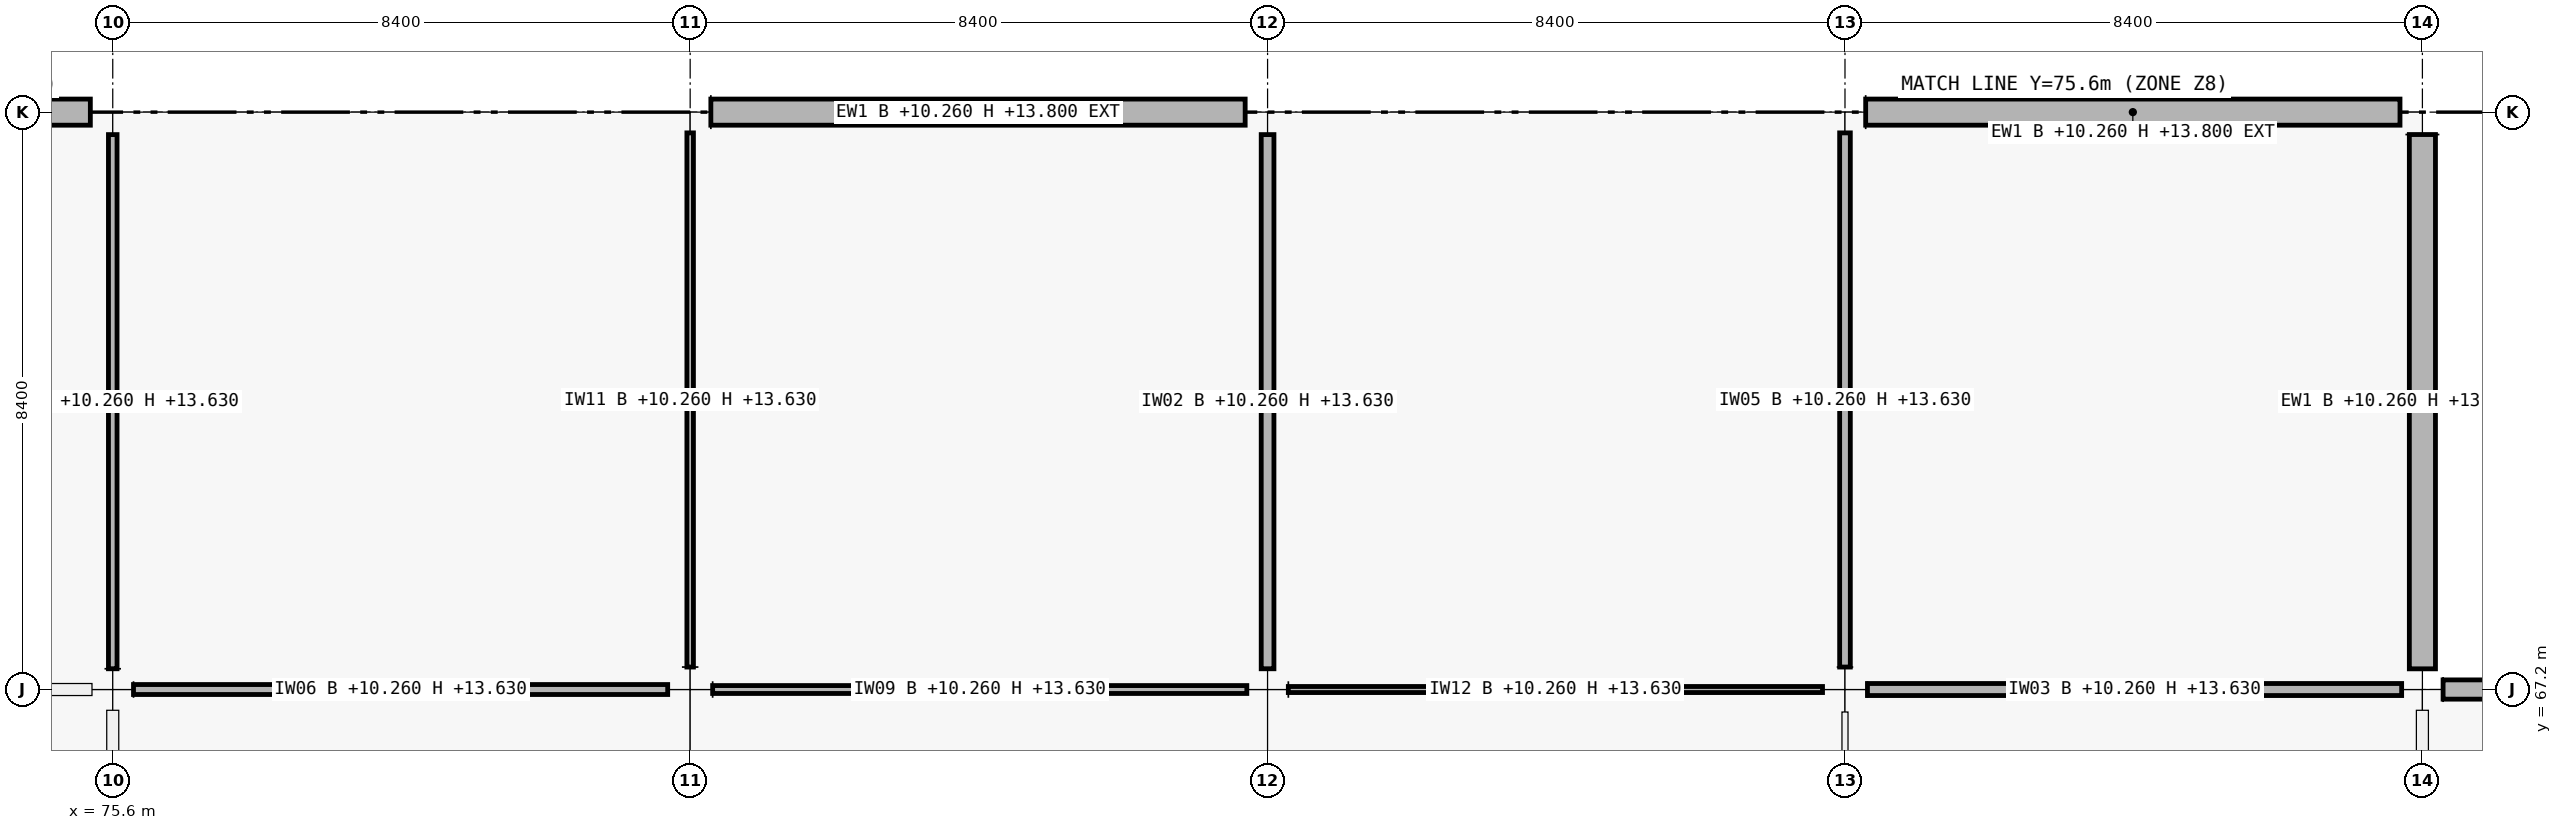
"""IFC4 building model, lengths in metres.
Left out: names, types, materials, properties, quantities, classifications, styles, units other than length and angle.
Written with IfcOpenShell. Run it as: python <this file> out.ifc"""

import sys

from ifc_helpers import new_model, si_unit, direction, frame, frame_2d, origin, origin_2d, place, context, subcontext, project, spatial, rectangle, extrude, element, fill, save


model = new_model("IFC4")
c1 = context("Model", 3, precision=1e-05, world=origin(), true_north=direction((0.0, 1.0)))
c2 = subcontext(c1, "Body", "Model", "MODEL_VIEW")
j1 = project(units=[si_unit("LENGTHUNIT", "METRE"), si_unit("PLANEANGLEUNIT", "RADIAN")], contexts=[c1])
p1 = place(None, origin())
s1 = spatial("IfcSite", under=j1, at=p1, CompositionType="ELEMENT")
p2 = place(p1, origin())
s2 = spatial("IfcBuilding", under=s1, at=p2, CompositionType="ELEMENT")
p3 = place(p2, frame((0.0, 0.0, 10.26)))
s3 = spatial("IfcBuildingStorey", under=s2, at=p3, CompositionType="ELEMENT", Elevation=10.26)
p4 = place(p3, frame((75.6, 67.2, 0.0), z_axis=(0.0, 0.0, 1.0), x_axis=(1.0, 0.0, 0.0)))
e1 = element("IfcColumn", 1, at=p4, inside=s3, PredefinedType="COLUMN", context=c2, shape_type="SweptSolid", body=[
    extrude(rectangle(XDim=0.6, YDim=0.6, at=origin_2d()), origin(), (0.0, 0.0, 1.0), 4.5),
])
for number, where, z_axis, x_axis in (
    (2, (75.6, 75.6, 0.0), (0.0, 0.0, 1.0), (1.0, 0.0, 0.0)),
    (3, (84.0, 67.2, 0.0), (0.0, 0.0, 1.0), (1.0, 0.0, 0.0)),
):
    element("IfcColumn", number, at=place(p3, frame(where, z_axis=z_axis, x_axis=x_axis)), inside=s3, PredefinedType="COLUMN", context=c2, shape_type="SweptSolid", body=[
        extrude(rectangle(XDim=0.65, YDim=0.65, at=origin_2d()), origin(), (0.0, 0.0, 1.0), 4.5),
    ])
for number, where, z_axis, x_axis in (
    (4, (84.0, 75.6, 0.0), (0.0, 0.0, 1.0), (1.0, 0.0, 0.0)),
    (5, (92.4, 67.2, 0.0), (0.0, 0.0, 1.0), (1.0, 0.0, 0.0)),
):
    element("IfcColumn", number, at=place(p3, frame(where, z_axis=z_axis, x_axis=x_axis)), inside=s3, PredefinedType="COLUMN", context=c2, shape_type="SweptSolid", body=[
        extrude(rectangle(XDim=0.6, YDim=0.6, at=origin_2d()), origin(), (0.0, 0.0, 1.0), 4.5),
    ])
for number, where, z_axis, x_axis in (
    (6, (92.4, 75.6, 0.0), (0.0, 0.0, 1.0), (1.0, 0.0, 0.0)),
    (7, (100.8, 67.2, 0.0), (0.0, 0.0, 1.0), (1.0, 0.0, 0.0)),
):
    element("IfcColumn", number, at=place(p3, frame(where, z_axis=z_axis, x_axis=x_axis)), inside=s3, PredefinedType="COLUMN", context=c2, shape_type="SweptSolid", body=[
        extrude(rectangle(XDim=0.65, YDim=0.65, at=origin_2d()), origin(), (0.0, 0.0, 1.0), 4.5),
    ])
for number, where, z_axis, x_axis in (
    (8, (100.8, 75.6, 0.0), (0.0, 0.0, 1.0), (1.0, 0.0, 0.0)),
    (9, (109.2, 67.2, 0.0), (0.0, 0.0, 1.0), (1.0, 0.0, 0.0)),
):
    element("IfcColumn", number, at=place(p3, frame(where, z_axis=z_axis, x_axis=x_axis)), inside=s3, PredefinedType="COLUMN", context=c2, shape_type="SweptSolid", body=[
        extrude(rectangle(XDim=0.6, YDim=0.6, at=origin_2d()), origin(), (0.0, 0.0, 1.0), 4.5),
    ])
p5 = place(p3, frame((109.2, 75.6, 0.0), z_axis=(0.0, 0.0, 1.0), x_axis=(1.0, 0.0, 0.0)))
e10 = element("IfcColumn", 10, at=p5, inside=s3, PredefinedType="COLUMN", context=c2, shape_type="SweptSolid", body=[
    extrude(rectangle(XDim=0.65, YDim=0.65, at=origin_2d()), origin(), (0.0, 0.0, 1.0), 4.5),
])
p6 = place(p3, frame((67.501, 75.6, 0.0), z_axis=(0.0, 0.0, 1.0), x_axis=(1.0, 0.0, 0.0)))
e11 = element("IfcWall", 11, at=p6, inside=s3, PredefinedType="SOLIDWALL", context=c2, shape_type="SweptSolid", body=[
    extrude(rectangle(XDim=7.773, YDim=0.38, at=frame_2d((3.886, 0.0))), origin(), (0.0, 0.0, 1.0), 3.54),
])
p7 = place(p3, frame((84.301, 75.6, 0.0), z_axis=(0.0, 0.0, 1.0), x_axis=(1.0, 0.0, 0.0)))
e12 = element("IfcWall", 12, at=p7, inside=s3, PredefinedType="SOLIDWALL", context=c2, shape_type="SweptSolid", body=[
    extrude(rectangle(XDim=7.773, YDim=0.38, at=frame_2d((3.886, 0.0))), origin(), (0.0, 0.0, 1.0), 3.54),
])
p8 = place(p7, frame((3.136, 0.0, 1.55)))
e13 = element("IfcOpeningElement", 13, at=p8, cuts=e12, PredefinedType="OPENING", context=c2, shape_type="SweptSolid", body=[
    extrude(rectangle(XDim=1.5, YDim=1.2, at=frame_2d((0.75, 0.6))), frame((0.0, 0.19, 0.0), z_axis=(0.0, -1.0, 0.0), x_axis=(1.0, 0.0, 0.0)), (0.0, 0.0, 1.0), 0.38),
])
for number, where, z_axis, x_axis in (
    (14, (101.101, 75.6, 0.0), (0.0, 0.0, 1.0), (1.0, 0.0, 0.0)),
    (15, (109.2, 75.274, 0.0), (0.0, 0.0, 1.0), (0.0, -1.0, 0.0)),
):
    element("IfcWall", number, at=place(p3, frame(where, z_axis=z_axis, x_axis=x_axis)), inside=s3, PredefinedType="SOLIDWALL", context=c2, shape_type="SweptSolid", body=[
        extrude(rectangle(XDim=7.773, YDim=0.38, at=frame_2d((3.886, 0.0))), origin(), (0.0, 0.0, 1.0), 3.54),
    ])
p9 = place(p3, frame((109.501, 67.2, 0.0), z_axis=(0.0, 0.0, 1.0), x_axis=(1.0, 0.0, 0.0)))
e16 = element("IfcWall", 16, at=p9, inside=s3, PredefinedType="SOLIDWALL", context=c2, shape_type="SweptSolid", body=[
    extrude(rectangle(XDim=7.823, YDim=0.28, at=frame_2d((3.912, 0.0))), origin(), (0.0, 0.0, 1.0), 3.54),
])
p10 = place(p9, frame((2.837, 0.0, 0.9)))
e17 = element("IfcOpeningElement", 17, at=p10, cuts=e16, PredefinedType="OPENING", context=c2, shape_type="SweptSolid", body=[
    extrude(rectangle(XDim=2.15, YDim=1.95, at=frame_2d((1.075, 0.975))), frame((0.0, 0.14, 0.0), z_axis=(0.0, -1.0, 0.0), x_axis=(1.0, 0.0, 0.0)), (0.0, 0.0, 1.0), 0.28),
])
p11 = place(p3, frame((67.527, 67.2, 0.0), z_axis=(0.0, 0.0, 1.0), x_axis=(1.0, 0.0, 0.0)))
e18 = element("IfcWall", 18, at=p11, inside=s3, PredefinedType="PARTITIONING", context=c2, shape_type="SweptSolid", body=[
    extrude(rectangle(XDim=7.771, YDim=0.175, at=frame_2d((3.885, 0.0))), origin(), (0.0, 0.0, 1.0), 3.37),
])
p12 = place(p11, frame((3.085, 0.0, 0.0)))
e19 = element("IfcOpeningElement", 19, at=p12, cuts=e18, PredefinedType="OPENING", context=c2, shape_type="SweptSolid", body=[
    extrude(rectangle(XDim=1.6, YDim=2.3, at=frame_2d((0.8, 1.15))), frame((0.0, 0.087, 0.0), z_axis=(0.0, -1.0, 0.0), x_axis=(1.0, 0.0, 0.0)), (0.0, 0.0, 1.0), 0.175),
])
p13 = place(p3, frame((75.902, 67.2, 0.0), z_axis=(0.0, 0.0, 1.0), x_axis=(1.0, 0.0, 0.0)))
e20 = element("IfcWall", 20, at=p13, inside=s3, PredefinedType="PARTITIONING", context=c2, shape_type="SweptSolid", body=[
    extrude(rectangle(XDim=7.771, YDim=0.145, at=frame_2d((3.885, 0.0))), origin(), (0.0, 0.0, 1.0), 3.37),
])
p14 = place(p13, frame((3.16, 0.0, 0.0)))
e21 = element("IfcOpeningElement", 21, at=p14, cuts=e20, PredefinedType="OPENING", context=c2, shape_type="SweptSolid", body=[
    extrude(rectangle(XDim=1.45, YDim=2.2, at=frame_2d((0.725, 1.1))), frame((0.0, 0.073, 0.0), z_axis=(0.0, -1.0, 0.0), x_axis=(1.0, 0.0, 0.0)), (0.0, 0.0, 1.0), 0.145),
])
p15 = place(p3, frame((84.327, 67.2, 0.0), z_axis=(0.0, 0.0, 1.0), x_axis=(1.0, 0.0, 0.0)))
e22 = element("IfcWall", 22, at=p15, inside=s3, PredefinedType="PARTITIONING", context=c2, shape_type="SweptSolid", body=[
    extrude(rectangle(XDim=7.771, YDim=0.115, at=frame_2d((3.885, 0.0))), origin(), (0.0, 0.0, 1.0), 3.37),
])
p16 = place(p15, frame((3.21, 0.0, 0.0)))
e23 = element("IfcOpeningElement", 23, at=p16, cuts=e22, PredefinedType="OPENING", context=c2, shape_type="SweptSolid", body=[
    extrude(rectangle(XDim=1.35, YDim=2.2, at=frame_2d((0.675, 1.1))), frame((0.0, 0.058, 0.0), z_axis=(0.0, -1.0, 0.0), x_axis=(1.0, 0.0, 0.0)), (0.0, 0.0, 1.0), 0.115),
])
p17 = place(p3, frame((92.702, 67.2, 0.0), z_axis=(0.0, 0.0, 1.0), x_axis=(1.0, 0.0, 0.0)))
e24 = element("IfcWall", 24, at=p17, inside=s3, PredefinedType="PARTITIONING", context=c2, shape_type="SweptSolid", body=[
    extrude(rectangle(XDim=7.771, YDim=0.088, at=frame_2d((3.885, 0.0))), origin(), (0.0, 0.0, 1.0), 3.37),
])
p18 = place(p17, frame((3.085, 0.0, 0.0)))
e25 = element("IfcOpeningElement", 25, at=p18, cuts=e24, PredefinedType="OPENING", context=c2, shape_type="SweptSolid", body=[
    extrude(rectangle(XDim=1.6, YDim=2.3, at=frame_2d((0.8, 1.15))), frame((0.0, 0.044, 0.0), z_axis=(0.0, -1.0, 0.0), x_axis=(1.0, 0.0, 0.0)), (0.0, 0.0, 1.0), 0.088),
])
p19 = place(p3, frame((101.127, 67.2, 0.0), z_axis=(0.0, 0.0, 1.0), x_axis=(1.0, 0.0, 0.0)))
e26 = element("IfcWall", 26, at=p19, inside=s3, PredefinedType="PARTITIONING", context=c2, shape_type="SweptSolid", body=[
    extrude(rectangle(XDim=7.771, YDim=0.175, at=frame_2d((3.885, 0.0))), origin(), (0.0, 0.0, 1.0), 3.37),
])
p20 = place(p19, frame((3.186, 0.0, 0.0)))
e27 = element("IfcOpeningElement", 27, at=p20, cuts=e26, PredefinedType="OPENING", context=c2, shape_type="SweptSolid", body=[
    extrude(rectangle(XDim=1.4, YDim=2.25, at=frame_2d((0.7, 1.125))), frame((0.0, 0.087, 0.0), z_axis=(0.0, -1.0, 0.0), x_axis=(1.0, 0.0, 0.0)), (0.0, 0.0, 1.0), 0.175),
])
p21 = place(p3, frame((75.6, 59.127, 0.0), z_axis=(0.0, 0.0, 1.0), x_axis=(0.0, 1.0, 0.0)))
e28 = element("IfcWall", 28, at=p21, inside=s3, PredefinedType="PARTITIONING", context=c2, shape_type="SweptSolid", body=[
    extrude(rectangle(XDim=7.771, YDim=0.175, at=frame_2d((3.885, 0.0))), origin(), (0.0, 0.0, 1.0), 3.37),
])
p22 = place(p21, frame((2.986, 0.0, 0.0)))
e29 = element("IfcOpeningElement", 29, at=p22, cuts=e28, PredefinedType="OPENING", context=c2, shape_type="SweptSolid", body=[
    extrude(rectangle(XDim=1.8, YDim=2.4, at=frame_2d((0.9, 1.2))), frame((0.0, 0.087, 0.0), z_axis=(0.0, -1.0, 0.0), x_axis=(1.0, 0.0, 0.0)), (0.0, 0.0, 1.0), 0.175),
])
p23 = place(p3, frame((75.6, 67.502, 0.0), z_axis=(0.0, 0.0, 1.0), x_axis=(0.0, 1.0, 0.0)))
e30 = element("IfcWall", 30, at=p23, inside=s3, PredefinedType="PARTITIONING", context=c2, shape_type="SweptSolid", body=[
    extrude(rectangle(XDim=7.771, YDim=0.125, at=frame_2d((3.885, 0.0))), origin(), (0.0, 0.0, 1.0), 3.37),
])
p24 = place(p23, frame((3.425, 0.0, 0.0)))
e31 = element("IfcOpeningElement", 31, at=p24, cuts=e30, PredefinedType="OPENING", context=c2, shape_type="SweptSolid", body=[
    extrude(rectangle(XDim=0.92, YDim=2.15, at=frame_2d((0.46, 1.075))), frame((0.0, 0.062, 0.0), z_axis=(0.0, -1.0, 0.0), x_axis=(1.0, 0.0, 0.0)), (0.0, 0.0, 1.0), 0.125),
])
p25 = place(p3, frame((84.0, 67.527, 0.0), z_axis=(0.0, 0.0, 1.0), x_axis=(0.0, 1.0, 0.0)))
e32 = element("IfcWall", 32, at=p25, inside=s3, PredefinedType="PARTITIONING", context=c2, shape_type="SweptSolid", body=[
    extrude(rectangle(XDim=7.771, YDim=0.095, at=frame_2d((3.885, 0.0))), origin(), (0.0, 0.0, 1.0), 3.37),
])
p26 = place(p25, frame((3.361, 0.0, 0.0)))
e33 = element("IfcOpeningElement", 33, at=p26, cuts=e32, PredefinedType="OPENING", context=c2, shape_type="SweptSolid", body=[
    extrude(rectangle(XDim=1.05, YDim=2.12, at=frame_2d((0.525, 1.06))), frame((0.0, 0.047, 0.0), z_axis=(0.0, -1.0, 0.0), x_axis=(1.0, 0.0, 0.0)), (0.0, 0.0, 1.0), 0.095),
])
p27 = place(p3, frame((92.4, 67.502, 0.0), z_axis=(0.0, 0.0, 1.0), x_axis=(0.0, 1.0, 0.0)))
e34 = element("IfcWall", 34, at=p27, inside=s3, PredefinedType="PARTITIONING", context=c2, shape_type="SweptSolid", body=[
    extrude(rectangle(XDim=7.771, YDim=0.185, at=frame_2d((3.885, 0.0))), origin(), (0.0, 0.0, 1.0), 3.37),
])
p28 = place(p27, frame((3.381, 0.0, 0.0)))
e35 = element("IfcOpeningElement", 35, at=p28, cuts=e34, PredefinedType="OPENING", context=c2, shape_type="SweptSolid", body=[
    extrude(rectangle(XDim=1.01, YDim=2.12, at=frame_2d((0.505, 1.06))), frame((0.0, 0.093, 0.0), z_axis=(0.0, -1.0, 0.0), x_axis=(1.0, 0.0, 0.0)), (0.0, 0.0, 1.0), 0.185),
])
p29 = place(p3, frame((100.8, 59.102, 0.0), z_axis=(0.0, 0.0, 1.0), x_axis=(0.0, 1.0, 0.0)))
e36 = element("IfcWall", 36, at=p29, inside=s3, PredefinedType="PARTITIONING", context=c2, shape_type="SweptSolid", body=[
    extrude(rectangle(XDim=7.771, YDim=0.088, at=frame_2d((3.885, 0.0))), origin(), (0.0, 0.0, 1.0), 3.37),
])
p30 = place(p29, frame((3.085, 0.0, 0.0)))
e37 = element("IfcOpeningElement", 37, at=p30, cuts=e36, PredefinedType="OPENING", context=c2, shape_type="SweptSolid", body=[
    extrude(rectangle(XDim=1.6, YDim=2.3, at=frame_2d((0.8, 1.15))), frame((0.0, 0.044, 0.0), z_axis=(0.0, -1.0, 0.0), x_axis=(1.0, 0.0, 0.0)), (0.0, 0.0, 1.0), 0.088),
])
p31 = place(p3, frame((100.8, 67.527, 0.0), z_axis=(0.0, 0.0, 1.0), x_axis=(0.0, 1.0, 0.0)))
e38 = element("IfcWall", 38, at=p31, inside=s3, PredefinedType="PARTITIONING", context=c2, shape_type="SweptSolid", body=[
    extrude(rectangle(XDim=7.771, YDim=0.155, at=frame_2d((3.885, 0.0))), origin(), (0.0, 0.0, 1.0), 3.37),
])
p32 = place(p31, frame((3.401, 0.0, 0.0)))
e39 = element("IfcOpeningElement", 39, at=p32, cuts=e38, PredefinedType="OPENING", context=c2, shape_type="SweptSolid", body=[
    extrude(rectangle(XDim=0.97, YDim=2.12, at=frame_2d((0.485, 1.06))), frame((0.0, 0.078, 0.0), z_axis=(0.0, -1.0, 0.0), x_axis=(1.0, 0.0, 0.0)), (0.0, 0.0, 1.0), 0.155),
])
p33 = place(p3, frame((109.2, 59.127, 0.0), z_axis=(0.0, 0.0, 1.0), x_axis=(0.0, 1.0, 0.0)))
e40 = element("IfcWall", 40, at=p33, inside=s3, PredefinedType="PARTITIONING", context=c2, shape_type="SweptSolid", body=[
    extrude(rectangle(XDim=7.771, YDim=0.175, at=frame_2d((3.885, 0.0))), origin(), (0.0, 0.0, 1.0), 3.37),
])
p34 = place(p8, origin())
e41 = element("IfcWindow", 41, at=p34, inside=s3, PartitioningType="SINGLE_PANEL", PredefinedType="WINDOW", context=c2, shape_type="SweptSolid", body=[
    extrude(rectangle(XDim=1.5, YDim=1.2, at=frame_2d((0.75, 0.6))), frame((0.0, 0.03, 0.0), z_axis=(0.0, -1.0, 0.0), x_axis=(1.0, 0.0, 0.0)), (0.0, 0.0, 1.0), 0.06),
])
fill(e13, e41)
p35 = place(p14, origin())
e42 = element("IfcDoor", 42, at=p35, inside=s3, OperationType="DOUBLE_DOOR_SINGLE_SWING", PredefinedType="DOOR", context=c2, shape_type="SweptSolid", body=[
    extrude(rectangle(XDim=1.45, YDim=2.2, at=frame_2d((0.725, 1.1))), frame((0.0, 0.025, 0.0), z_axis=(0.0, -1.0, 0.0), x_axis=(1.0, 0.0, 0.0)), (0.0, 0.0, 1.0), 0.05),
])
fill(e21, e42)
p36 = place(p16, origin())
e43 = element("IfcDoor", 43, at=p36, inside=s3, OperationType="DOUBLE_DOOR_SINGLE_SWING", PredefinedType="DOOR", context=c2, shape_type="SweptSolid", body=[
    extrude(rectangle(XDim=1.35, YDim=2.2, at=frame_2d((0.675, 1.1))), frame((0.0, 0.025, 0.0), z_axis=(0.0, -1.0, 0.0), x_axis=(1.0, 0.0, 0.0)), (0.0, 0.0, 1.0), 0.05),
])
fill(e23, e43)
p37 = place(p18, origin())
e44 = element("IfcDoor", 44, at=p37, inside=s3, OperationType="DOUBLE_DOOR_SINGLE_SWING", PredefinedType="DOOR", context=c2, shape_type="SweptSolid", body=[
    extrude(rectangle(XDim=1.6, YDim=2.3, at=frame_2d((0.8, 1.15))), frame((0.0, 0.025, 0.0), z_axis=(0.0, -1.0, 0.0), x_axis=(1.0, 0.0, 0.0)), (0.0, 0.0, 1.0), 0.05),
])
fill(e25, e44)
p38 = place(p20, origin())
e45 = element("IfcDoor", 45, at=p38, inside=s3, OperationType="DOUBLE_DOOR_SINGLE_SWING", PredefinedType="DOOR", context=c2, shape_type="SweptSolid", body=[
    extrude(rectangle(XDim=1.4, YDim=2.25, at=frame_2d((0.7, 1.125))), frame((0.0, 0.025, 0.0), z_axis=(0.0, -1.0, 0.0), x_axis=(1.0, 0.0, 0.0)), (0.0, 0.0, 1.0), 0.05),
])
fill(e27, e45)
p39 = place(p24, origin())
e46 = element("IfcDoor", 46, at=p39, inside=s3, OperationType="SINGLE_SWING_LEFT", PredefinedType="DOOR", context=c2, shape_type="SweptSolid", body=[
    extrude(rectangle(XDim=0.92, YDim=2.15, at=frame_2d((0.46, 1.075))), frame((0.0, 0.025, 0.0), z_axis=(0.0, -1.0, 0.0), x_axis=(1.0, 0.0, 0.0)), (0.0, 0.0, 1.0), 0.05),
])
fill(e31, e46)
p40 = place(p26, origin())
e47 = element("IfcDoor", 47, at=p40, inside=s3, OperationType="SINGLE_SWING_RIGHT", PredefinedType="DOOR", context=c2, shape_type="SweptSolid", body=[
    extrude(rectangle(XDim=1.05, YDim=2.12, at=frame_2d((0.525, 1.06))), frame((0.0, 0.025, 0.0), z_axis=(0.0, -1.0, 0.0), x_axis=(1.0, 0.0, 0.0)), (0.0, 0.0, 1.0), 0.05),
])
fill(e33, e47)
p41 = place(p28, origin())
e48 = element("IfcDoor", 48, at=p41, inside=s3, OperationType="SINGLE_SWING_LEFT", PredefinedType="DOOR", context=c2, shape_type="SweptSolid", body=[
    extrude(rectangle(XDim=1.01, YDim=2.12, at=frame_2d((0.505, 1.06))), frame((0.0, 0.025, 0.0), z_axis=(0.0, -1.0, 0.0), x_axis=(1.0, 0.0, 0.0)), (0.0, 0.0, 1.0), 0.05),
])
fill(e35, e48)
p42 = place(p32, origin())
e49 = element("IfcDoor", 49, at=p42, inside=s3, OperationType="SINGLE_SWING_RIGHT", PredefinedType="DOOR", context=c2, shape_type="SweptSolid", body=[
    extrude(rectangle(XDim=0.97, YDim=2.12, at=frame_2d((0.485, 1.06))), frame((0.0, 0.025, 0.0), z_axis=(0.0, -1.0, 0.0), x_axis=(1.0, 0.0, 0.0)), (0.0, 0.0, 1.0), 0.05),
])
fill(e39, e49)
save(model, sys.argv[1])
